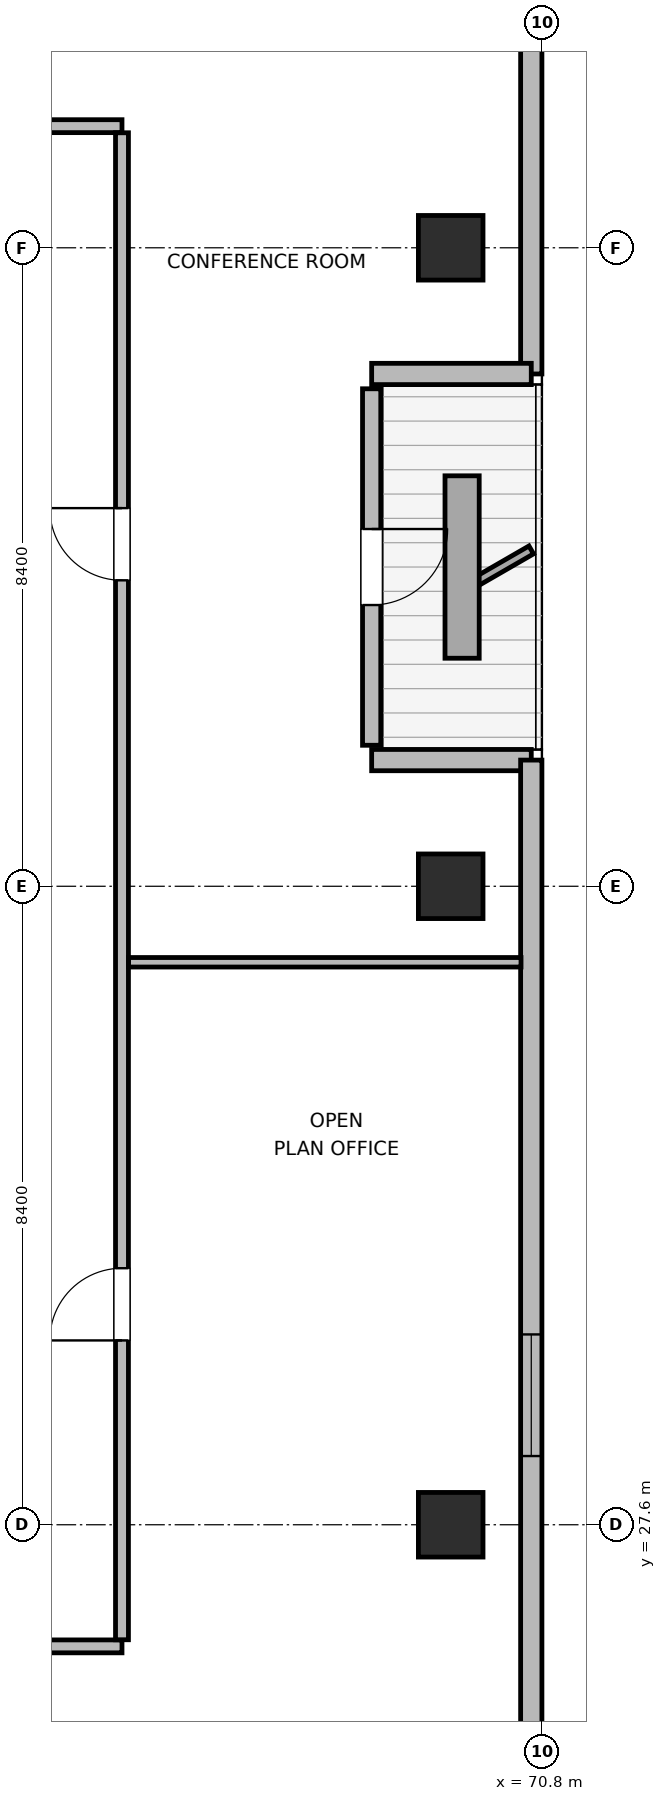
"""IFC4 building model, lengths in metres.
Left out: names, types, materials, properties, quantities, classifications, styles, units other than length and angle.
Written with IfcOpenShell. Run it as: python <this file> out.ifc"""

import sys

from ifc_helpers import new_model, si_unit, direction, frame, frame_2d, origin, origin_2d, place, context, subcontext, project, spatial, rectangle, extrude, element, fill, save


model = new_model("IFC4")
c1 = context("Model", 3, precision=1e-05, world=origin(), true_north=direction((0.0, 1.0)))
c2 = subcontext(c1, "Body", "Model", "MODEL_VIEW")
j1 = project(units=[si_unit("LENGTHUNIT", "METRE"), si_unit("PLANEANGLEUNIT", "RADIAN")], contexts=[c1])
p1 = place(None, origin())
s1 = spatial("IfcSite", under=j1, at=p1, CompositionType="ELEMENT")
p2 = place(p1, origin())
s2 = spatial("IfcBuilding", under=s1, at=p2, CompositionType="ELEMENT")
p3 = place(p2, frame((0.0, 0.0, 314.1)))
s3 = spatial("IfcBuildingStorey", under=s2, at=p3, CompositionType="ELEMENT", Elevation=314.1)
for number, where, z_axis, x_axis in (
    (1, (69.6, 27.6, 0.0), (0.0, 0.0, 1.0), (1.0, 0.0, 0.0)),
    (2, (69.6, 36.0, 0.0), (0.0, 0.0, 1.0), (1.0, 0.0, 0.0)),
    (3, (69.6, 44.4, 0.0), (0.0, 0.0, 1.0), (1.0, 0.0, 0.0)),
):
    element("IfcColumn", number, at=place(p3, frame(where, z_axis=z_axis, x_axis=x_axis)), inside=s3, PredefinedType="COLUMN", context=c2, shape_type="SweptSolid", body=[
        extrude(rectangle(XDim=0.85, YDim=0.85, at=origin_2d()), origin(), (0.0, 0.0, 1.0), 3.9),
    ])
p4 = place(p3, frame((70.66, 48.582, 0.0), z_axis=(0.0, 0.0, 1.0), x_axis=(0.0, -1.0, 0.0)))
e4 = element("IfcWall", 4, at=p4, inside=s3, PredefinedType="SOLIDWALL", context=c2, shape_type="SweptSolid", body=[
    extrude(rectangle(XDim=5.842, YDim=0.28, at=frame_2d((2.921, 0.0))), origin(), (0.0, 0.0, 1.0), 3.68),
])
p5 = place(p3, frame((70.66, 42.74, 0.0), z_axis=(0.0, 0.0, 1.0), x_axis=(-1.0, 0.0, 0.0)))
e5 = element("IfcWall", 5, at=p5, inside=s3, PredefinedType="SOLIDWALL", context=c2, shape_type="SweptSolid", body=[
    extrude(rectangle(XDim=2.1, YDim=0.28, at=frame_2d((1.05, 0.0))), origin(), (0.0, 0.0, 1.0), 3.126),
])
p6 = place(p3, frame((68.56, 42.545, 0.0), z_axis=(0.0, 0.0, 1.0), x_axis=(0.0, -1.0, 0.0)))
e6 = element("IfcWall", 6, at=p6, inside=s3, PredefinedType="SOLIDWALL", context=c2, shape_type="SweptSolid", body=[
    extrude(rectangle(XDim=4.69, YDim=0.24, at=frame_2d((2.345, 0.0))), origin(), (0.0, 0.0, 1.0), 3.311),
])
p7 = place(p6, frame((1.845, 0.0, 0.0)))
e7 = element("IfcOpeningElement", 7, at=p7, cuts=e6, PredefinedType="OPENING", context=c2, shape_type="SweptSolid", body=[
    extrude(rectangle(XDim=1.0, YDim=2.02, at=frame_2d((0.5, 1.01))), frame((0.0, 0.13, 0.0), z_axis=(0.0, -1.0, 0.0), x_axis=(1.0, 0.0, 0.0)), (0.0, 0.0, 1.0), 0.26),
])
p8 = place(p3, frame((68.56, 37.66, 0.0), z_axis=(0.0, 0.0, 1.0), x_axis=(1.0, 0.0, 0.0)))
e8 = element("IfcWall", 8, at=p8, inside=s3, PredefinedType="SOLIDWALL", context=c2, shape_type="SweptSolid", body=[
    extrude(rectangle(XDim=2.1, YDim=0.28, at=frame_2d((1.05, 0.0))), origin(), (0.0, 0.0, 1.0), 3.126),
])
p9 = place(p3, frame((70.66, 37.66, 0.0), z_axis=(0.0, 0.0, 1.0), x_axis=(0.0, -1.0, 0.0)))
e9 = element("IfcWall", 9, at=p9, inside=s3, PredefinedType="SOLIDWALL", context=c2, shape_type="SweptSolid", body=[
    extrude(rectangle(XDim=14.241, YDim=0.28, at=frame_2d((7.121, 0.0))), origin(), (0.0, 0.0, 1.0), 3.68),
])
p10 = place(p9, frame((7.556, 0.0, 0.85)))
e10 = element("IfcOpeningElement", 10, at=p10, cuts=e9, PredefinedType="OPENING", context=c2, shape_type="SweptSolid", body=[
    extrude(rectangle(XDim=1.6, YDim=1.0, at=frame_2d((0.8, 0.5))), frame((0.0, 0.15, 0.0), z_axis=(0.0, -1.0, 0.0), x_axis=(1.0, 0.0, 0.0)), (0.0, 0.0, 1.0), 0.3),
])
p11 = place(p3, frame((30.725, 26.0, 0.0), z_axis=(0.0, 0.0, 1.0), x_axis=(1.0, 0.0, 0.0)))
e11 = element("IfcWall", 11, at=p11, inside=s3, PredefinedType="PARTITIONING", context=c2, shape_type="SweptSolid", body=[
    extrude(rectangle(XDim=34.55, YDim=0.17, at=frame_2d((17.275, 0.0))), origin(), (0.0, 0.0, 1.0), 3.68),
])
p12 = place(p11, frame((2.563, 0.0, 0.0)))
e12 = element("IfcOpeningElement", 12, at=p12, cuts=e11, PredefinedType="OPENING", context=c2, shape_type="SweptSolid", body=[
    extrude(rectangle(XDim=0.95, YDim=2.04, at=frame_2d((0.475, 1.02))), frame((0.0, 0.095, 0.0), z_axis=(0.0, -1.0, 0.0), x_axis=(1.0, 0.0, 0.0)), (0.0, 0.0, 1.0), 0.19),
])
p13 = place(p11, frame((7.6, 0.0, 0.0)))
e13 = element("IfcOpeningElement", 13, at=p13, cuts=e11, PredefinedType="OPENING", context=c2, shape_type="SweptSolid", body=[
    extrude(rectangle(XDim=0.95, YDim=2.04, at=frame_2d((0.475, 1.02))), frame((0.0, 0.095, 0.0), z_axis=(0.0, -1.0, 0.0), x_axis=(1.0, 0.0, 0.0)), (0.0, 0.0, 1.0), 0.19),
])
p14 = place(p11, frame((12.9, 0.0, 0.0)))
e14 = element("IfcOpeningElement", 14, at=p14, cuts=e11, PredefinedType="OPENING", context=c2, shape_type="SweptSolid", body=[
    extrude(rectangle(XDim=0.95, YDim=2.04, at=frame_2d((0.475, 1.02))), frame((0.0, 0.095, 0.0), z_axis=(0.0, -1.0, 0.0), x_axis=(1.0, 0.0, 0.0)), (0.0, 0.0, 1.0), 0.19),
])
p15 = place(p11, frame((18.7, 0.0, 0.0)))
e15 = element("IfcOpeningElement", 15, at=p15, cuts=e11, PredefinedType="OPENING", context=c2, shape_type="SweptSolid", body=[
    extrude(rectangle(XDim=0.95, YDim=2.04, at=frame_2d((0.475, 1.02))), frame((0.0, 0.095, 0.0), z_axis=(0.0, -1.0, 0.0), x_axis=(1.0, 0.0, 0.0)), (0.0, 0.0, 1.0), 0.19),
])
p16 = place(p11, frame((23.4, 0.0, 0.0)))
e16 = element("IfcOpeningElement", 16, at=p16, cuts=e11, PredefinedType="OPENING", context=c2, shape_type="SweptSolid", body=[
    extrude(rectangle(XDim=0.95, YDim=2.04, at=frame_2d((0.475, 1.02))), frame((0.0, 0.095, 0.0), z_axis=(0.0, -1.0, 0.0), x_axis=(1.0, 0.0, 0.0)), (0.0, 0.0, 1.0), 0.19),
])
p17 = place(p11, frame((27.5, 0.0, 0.0)))
e17 = element("IfcOpeningElement", 17, at=p17, cuts=e11, PredefinedType="OPENING", context=c2, shape_type="SweptSolid", body=[
    extrude(rectangle(XDim=0.95, YDim=2.04, at=frame_2d((0.475, 1.02))), frame((0.0, 0.095, 0.0), z_axis=(0.0, -1.0, 0.0), x_axis=(1.0, 0.0, 0.0)), (0.0, 0.0, 1.0), 0.19),
])
p18 = place(p11, frame((31.738, 0.0, 0.0)))
e18 = element("IfcOpeningElement", 18, at=p18, cuts=e11, PredefinedType="OPENING", context=c2, shape_type="SweptSolid", body=[
    extrude(rectangle(XDim=0.95, YDim=2.04, at=frame_2d((0.475, 1.02))), frame((0.0, 0.095, 0.0), z_axis=(0.0, -1.0, 0.0), x_axis=(1.0, 0.0, 0.0)), (0.0, 0.0, 1.0), 0.19),
])
p19 = place(p3, frame((30.725, 46.0, 0.0), z_axis=(0.0, 0.0, 1.0), x_axis=(1.0, 0.0, 0.0)))
e19 = element("IfcWall", 19, at=p19, inside=s3, PredefinedType="PARTITIONING", context=c2, shape_type="SweptSolid", body=[
    extrude(rectangle(XDim=34.55, YDim=0.17, at=frame_2d((17.275, 0.0))), origin(), (0.0, 0.0, 1.0), 3.68),
])
p20 = place(p19, frame((2.162, 0.0, 0.0)))
e20 = element("IfcOpeningElement", 20, at=p20, cuts=e19, PredefinedType="OPENING", context=c2, shape_type="SweptSolid", body=[
    extrude(rectangle(XDim=0.95, YDim=2.04, at=frame_2d((0.475, 1.02))), frame((0.0, 0.095, 0.0), z_axis=(0.0, -1.0, 0.0), x_axis=(1.0, 0.0, 0.0)), (0.0, 0.0, 1.0), 0.19),
])
p21 = place(p19, frame((9.8, 0.0, 0.0)))
e21 = element("IfcOpeningElement", 21, at=p21, cuts=e19, PredefinedType="OPENING", context=c2, shape_type="SweptSolid", body=[
    extrude(rectangle(XDim=0.95, YDim=2.04, at=frame_2d((0.475, 1.02))), frame((0.0, 0.095, 0.0), z_axis=(0.0, -1.0, 0.0), x_axis=(1.0, 0.0, 0.0)), (0.0, 0.0, 1.0), 0.19),
])
p22 = place(p19, frame((19.8, 0.0, 0.0)))
e22 = element("IfcOpeningElement", 22, at=p22, cuts=e19, PredefinedType="OPENING", context=c2, shape_type="SweptSolid", body=[
    extrude(rectangle(XDim=0.95, YDim=2.04, at=frame_2d((0.475, 1.02))), frame((0.0, 0.095, 0.0), z_axis=(0.0, -1.0, 0.0), x_axis=(1.0, 0.0, 0.0)), (0.0, 0.0, 1.0), 0.19),
])
p23 = place(p19, frame((29.438, 0.0, 0.0)))
e23 = element("IfcOpeningElement", 23, at=p23, cuts=e19, PredefinedType="OPENING", context=c2, shape_type="SweptSolid", body=[
    extrude(rectangle(XDim=0.95, YDim=2.04, at=frame_2d((0.475, 1.02))), frame((0.0, 0.095, 0.0), z_axis=(0.0, -1.0, 0.0), x_axis=(1.0, 0.0, 0.0)), (0.0, 0.0, 1.0), 0.19),
])
p24 = place(p3, frame((65.275, 26.087, 0.0), z_axis=(0.0, 0.0, 1.0), x_axis=(0.0, 1.0, 0.0)))
e24 = element("IfcWall", 24, at=p24, inside=s3, PredefinedType="PARTITIONING", context=c2, shape_type="SweptSolid", body=[
    extrude(rectangle(XDim=19.826, YDim=0.17, at=frame_2d((9.913, 0.0))), origin(), (0.0, 0.0, 1.0), 3.68),
])
p25 = place(p24, frame((3.938, 0.0, 0.0)))
e25 = element("IfcOpeningElement", 25, at=p25, cuts=e24, PredefinedType="OPENING", context=c2, shape_type="SweptSolid", body=[
    extrude(rectangle(XDim=0.95, YDim=2.04, at=frame_2d((0.475, 1.02))), frame((0.0, 0.095, 0.0), z_axis=(0.0, -1.0, 0.0), x_axis=(1.0, 0.0, 0.0)), (0.0, 0.0, 1.0), 0.19),
])
p26 = place(p24, frame((13.938, 0.0, 0.0)))
e26 = element("IfcOpeningElement", 26, at=p26, cuts=e24, PredefinedType="OPENING", context=c2, shape_type="SweptSolid", body=[
    extrude(rectangle(XDim=0.95, YDim=2.04, at=frame_2d((0.475, 1.02))), frame((0.0, 0.095, 0.0), z_axis=(0.0, -1.0, 0.0), x_axis=(1.0, 0.0, 0.0)), (0.0, 0.0, 1.0), 0.19),
])
p27 = place(p3, frame((65.362, 35.0, 0.0), z_axis=(0.0, 0.0, 1.0), x_axis=(1.0, 0.0, 0.0)))
e27 = element("IfcWall", 27, at=p27, inside=s3, PredefinedType="PARTITIONING", context=c2, shape_type="SweptSolid", body=[
    extrude(rectangle(XDim=5.163, YDim=0.125, at=frame_2d((2.582, 0.0))), origin(), (0.0, 0.0, 1.0), 3.68),
])
p28 = place(p7, origin())
e28 = element("IfcDoor", 28, at=p28, inside=s3, OperationType="SINGLE_SWING_LEFT", PredefinedType="DOOR", context=c2, shape_type="SweptSolid", body=[
    extrude(rectangle(XDim=1.0, YDim=2.02, at=frame_2d((0.5, 1.01))), frame((0.0, 0.025, 0.0), z_axis=(0.0, -1.0, 0.0), x_axis=(1.0, 0.0, 0.0)), (0.0, 0.0, 1.0), 0.05),
])
fill(e7, e28)
p29 = place(p10, origin())
e29 = element("IfcWindow", 29, at=p29, inside=s3, PartitioningType="SINGLE_PANEL", PredefinedType="WINDOW", context=c2, shape_type="SweptSolid", body=[
    extrude(rectangle(XDim=1.6, YDim=1.0, at=frame_2d((0.8, 0.5))), frame((0.0, 0.03, 0.0), z_axis=(0.0, -1.0, 0.0), x_axis=(1.0, 0.0, 0.0)), (0.0, 0.0, 1.0), 0.06),
])
fill(e10, e29)
p30 = place(p25, origin())
e30 = element("IfcDoor", 30, at=p30, inside=s3, OperationType="SINGLE_SWING_LEFT", PredefinedType="DOOR", context=c2, shape_type="SweptSolid", body=[
    extrude(rectangle(XDim=0.95, YDim=2.04, at=frame_2d((0.475, 1.02))), frame((0.0, 0.025, 0.0), z_axis=(0.0, -1.0, 0.0), x_axis=(1.0, 0.0, 0.0)), (0.0, 0.0, 1.0), 0.05),
])
fill(e25, e30)
p31 = place(p26, origin())
e31 = element("IfcDoor", 31, at=p31, inside=s3, OperationType="SINGLE_SWING_RIGHT", PredefinedType="DOOR", context=c2, shape_type="SweptSolid", body=[
    extrude(rectangle(XDim=0.95, YDim=2.04, at=frame_2d((0.475, 1.02))), frame((0.0, 0.025, 0.0), z_axis=(0.0, -1.0, 0.0), x_axis=(1.0, 0.0, 0.0)), (0.0, 0.0, 1.0), 0.05),
])
fill(e26, e31)
save(model, sys.argv[1])
